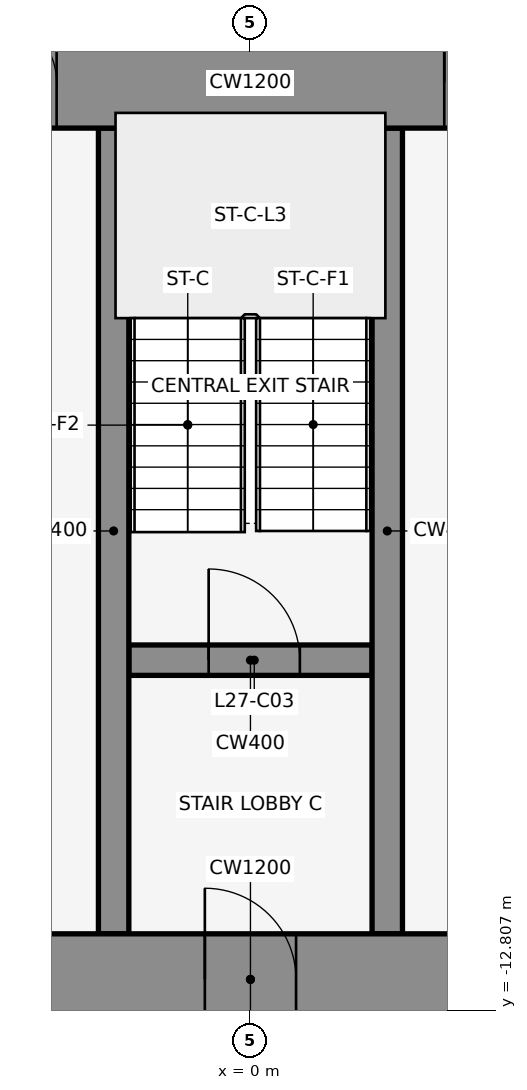
"""IFC4 building model, lengths in metres.
Left out: names, types, materials, properties, quantities, classifications, styles, units other than length and angle.
Written with IfcOpenShell. Run it as: python <this file> out.ifc"""

import sys

from ifc_helpers import new_model, si_unit, direction, frame, frame_2d, origin, place, context, subcontext, project, spatial, rectangle, extrude, element, fill, save


model = new_model("IFC4")
c1 = context("Model", 3, precision=1e-05, world=origin(), true_north=direction((0.0, 1.0)))
c2 = subcontext(c1, "Body", "Model", "MODEL_VIEW")
j1 = project(units=[si_unit("LENGTHUNIT", "METRE"), si_unit("PLANEANGLEUNIT", "RADIAN")], contexts=[c1])
p1 = place(None, origin())
s1 = spatial("IfcSite", under=j1, at=p1, CompositionType="ELEMENT")
p2 = place(p1, origin())
s2 = spatial("IfcBuilding", under=s1, at=p2, CompositionType="ELEMENT")
p3 = place(p2, frame((0.0, 0.0, 126.8)))
s3 = spatial("IfcBuildingStorey", under=s2, at=p3, CompositionType="ELEMENT", Elevation=126.8)
for number, where, z_axis, x_axis in (
    (1, (1.901, 1.08, 0.0), (0.0, 0.0, 1.0), (-0.84, -0.543, 0.0)),
    (2, (-0.068, -0.105, 0.0), (0.0, 0.0, 1.0), (-0.84, 0.543, 0.0)),
):
    element("IfcWall", number, at=place(p3, frame(where, z_axis=z_axis, x_axis=x_axis)), inside=s3, PredefinedType="STANDARD", context=c2, shape_type="SweptSolid", body=[
        extrude(rectangle(XDim=2.183, YDim=0.25, at=frame_2d((1.091, 0.0))), origin(), (0.0, 0.0, 1.0), 3.95),
    ])
p4 = place(p3, frame((-1.6, -8.2, 0.0), z_axis=(0.0, 0.0, 1.0), x_axis=(1.0, 0.0, 0.0)))
e3 = element("IfcWall", 3, at=p4, inside=s3, PredefinedType="SHEAR", context=c2, shape_type="SweptSolid", body=[
    extrude(rectangle(XDim=3.2, YDim=0.4, at=frame_2d((1.6, 0.0))), origin(), (0.0, 0.0, 1.0), 4.1),
])
p5 = place(p4, frame((1.05, 0.0, 0.0)))
e4 = element("IfcOpeningElement", 4, at=p5, cuts=e3, PredefinedType="OPENING", context=c2, shape_type="SweptSolid", body=[
    extrude(rectangle(XDim=1.2, YDim=2.1, at=frame_2d((0.6, 1.05))), frame((0.0, 0.212, 0.0), z_axis=(0.0, -1.0, 0.0), x_axis=(1.0, 0.0, 0.0)), (0.0, 0.0, 1.0), 0.424),
])
for number, where, z_axis, x_axis in (
    (5, (-1.8, -11.8, 0.0), (0.0, 0.0, 1.0), (0.0, 1.0, 0.0)),
    (6, (1.8, -11.8, 0.0), (0.0, 0.0, 1.0), (0.0, 1.0, 0.0)),
):
    element("IfcWall", number, at=place(p3, frame(where, z_axis=z_axis, x_axis=x_axis)), inside=s3, PredefinedType="SHEAR", context=c2, shape_type="SweptSolid", body=[
        extrude(rectangle(XDim=10.6, YDim=0.4, at=frame_2d((5.3, 0.0))), origin(), (0.0, 0.0, 1.0), 4.1),
    ])
p6 = place(p3, frame((-22.0, -0.6, 0.0), z_axis=(0.0, 0.0, 1.0), x_axis=(1.0, 0.0, 0.0)))
e7 = element("IfcWall", 7, at=p6, inside=s3, PredefinedType="SHEAR", context=c2, shape_type="SweptSolid", body=[
    extrude(rectangle(XDim=44.0, YDim=1.2, at=frame_2d((22.0, 0.0))), origin(), (0.0, 0.0, 1.0), 4.1),
])
p7 = place(p6, frame((18.55, 0.0, 0.0)))
e8 = element("IfcOpeningElement", 8, at=p7, cuts=e7, PredefinedType="OPENING", context=c2, shape_type="SweptSolid", body=[
    extrude(rectangle(XDim=0.9, YDim=2.1, at=frame_2d((0.45, 1.05))), frame((0.0, 0.612, 0.0), z_axis=(0.0, -1.0, 0.0), x_axis=(1.0, 0.0, 0.0)), (0.0, 0.0, 1.0), 1.224),
])
p8 = place(p6, frame((24.55, 0.0, 0.0)))
e9 = element("IfcOpeningElement", 9, at=p8, cuts=e7, PredefinedType="OPENING", context=c2, shape_type="SweptSolid", body=[
    extrude(rectangle(XDim=0.9, YDim=2.1, at=frame_2d((0.45, 1.05))), frame((0.0, 0.612, 0.0), z_axis=(0.0, -1.0, 0.0), x_axis=(1.0, 0.0, 0.0)), (0.0, 0.0, 1.0), 1.224),
])
p9 = place(p3, frame((-22.0, -12.4, 0.0), z_axis=(0.0, 0.0, 1.0), x_axis=(1.0, 0.0, 0.0)))
e10 = element("IfcWall", 10, at=p9, inside=s3, PredefinedType="SHEAR", context=c2, shape_type="SweptSolid", body=[
    extrude(rectangle(XDim=44.0, YDim=1.2, at=frame_2d((22.0, 0.0))), origin(), (0.0, 0.0, 1.0), 4.1),
])
p10 = place(p9, frame((2.2, 0.0, 0.0)))
e11 = element("IfcOpeningElement", 11, at=p10, cuts=e10, PredefinedType="OPENING", context=c2, shape_type="SweptSolid", body=[
    extrude(rectangle(XDim=1.2, YDim=2.1, at=frame_2d((0.6, 1.05))), frame((0.0, 0.612, 0.0), z_axis=(0.0, -1.0, 0.0), x_axis=(1.0, 0.0, 0.0)), (0.0, 0.0, 1.0), 1.224),
])
p11 = place(p9, frame((21.4, 0.0, 0.0)))
e12 = element("IfcOpeningElement", 12, at=p11, cuts=e10, PredefinedType="OPENING", context=c2, shape_type="SweptSolid", body=[
    extrude(rectangle(XDim=1.2, YDim=2.1, at=frame_2d((0.6, 1.05))), frame((0.0, 0.612, 0.0), z_axis=(0.0, -1.0, 0.0), x_axis=(1.0, 0.0, 0.0)), (0.0, 0.0, 1.0), 1.224),
])
p12 = place(p9, frame((40.6, 0.0, 0.0)))
e13 = element("IfcOpeningElement", 13, at=p12, cuts=e10, PredefinedType="OPENING", context=c2, shape_type="SweptSolid", body=[
    extrude(rectangle(XDim=1.2, YDim=2.1, at=frame_2d((0.6, 1.05))), frame((0.0, 0.612, 0.0), z_axis=(0.0, -1.0, 0.0), x_axis=(1.0, 0.0, 0.0)), (0.0, 0.0, 1.0), 1.224),
])
p13 = place(p9, frame((16.0, 0.0, 0.0)))
e14 = element("IfcOpeningElement", 14, at=p13, cuts=e10, PredefinedType="OPENING", context=c2, shape_type="SweptSolid", body=[
    extrude(rectangle(XDim=1.8, YDim=2.1, at=frame_2d((0.9, 1.05))), frame((0.0, 0.612, 0.0), z_axis=(0.0, -1.0, 0.0), x_axis=(1.0, 0.0, 0.0)), (0.0, 0.0, 1.0), 1.224),
])
p14 = place(p9, frame((6.3, 0.0, 0.0)))
e15 = element("IfcOpeningElement", 15, at=p14, cuts=e10, PredefinedType="OPENING", context=c2, shape_type="SweptSolid", body=[
    extrude(rectangle(XDim=1.2, YDim=2.1, at=frame_2d((0.6, 1.05))), frame((0.0, 0.612, 0.0), z_axis=(0.0, -1.0, 0.0), x_axis=(1.0, 0.0, 0.0)), (0.0, 0.0, 1.0), 1.224),
])
p15 = place(p9, frame((26.2, 0.0, 0.0)))
e16 = element("IfcOpeningElement", 16, at=p15, cuts=e10, PredefinedType="OPENING", context=c2, shape_type="SweptSolid", body=[
    extrude(rectangle(XDim=1.8, YDim=2.1, at=frame_2d((0.9, 1.05))), frame((0.0, 0.612, 0.0), z_axis=(0.0, -1.0, 0.0), x_axis=(1.0, 0.0, 0.0)), (0.0, 0.0, 1.0), 1.224),
])
p16 = place(p9, frame((36.5, 0.0, 0.0)))
e17 = element("IfcOpeningElement", 17, at=p16, cuts=e10, PredefinedType="OPENING", context=c2, shape_type="SweptSolid", body=[
    extrude(rectangle(XDim=1.2, YDim=2.1, at=frame_2d((0.6, 1.05))), frame((0.0, 0.612, 0.0), z_axis=(0.0, -1.0, 0.0), x_axis=(1.0, 0.0, 0.0)), (0.0, 0.0, 1.0), 1.224),
])
p17 = place(p5, origin())
e18 = element("IfcDoor", 18, at=p17, inside=s3, OperationType="SINGLE_SWING_LEFT", PredefinedType="DOOR", context=c2, shape_type="SweptSolid", body=[
    extrude(rectangle(XDim=1.2, YDim=2.1, at=frame_2d((0.6, 1.05))), frame((0.0, 0.025, 0.0), z_axis=(0.0, -1.0, 0.0), x_axis=(1.0, 0.0, 0.0)), (0.0, 0.0, 1.0), 0.05),
])
fill(e4, e18)
p18 = place(p7, origin())
e19 = element("IfcDoor", 19, at=p18, inside=s3, OperationType="SINGLE_SWING_LEFT", PredefinedType="DOOR", context=c2, shape_type="SweptSolid", body=[
    extrude(rectangle(XDim=0.9, YDim=2.1, at=frame_2d((0.45, 1.05))), frame((0.0, 0.025, 0.0), z_axis=(0.0, -1.0, 0.0), x_axis=(1.0, 0.0, 0.0)), (0.0, 0.0, 1.0), 0.05),
])
fill(e8, e19)
p19 = place(p8, origin())
e20 = element("IfcDoor", 20, at=p19, inside=s3, OperationType="SINGLE_SWING_LEFT", PredefinedType="DOOR", context=c2, shape_type="SweptSolid", body=[
    extrude(rectangle(XDim=0.9, YDim=2.1, at=frame_2d((0.45, 1.05))), frame((0.0, 0.025, 0.0), z_axis=(0.0, -1.0, 0.0), x_axis=(1.0, 0.0, 0.0)), (0.0, 0.0, 1.0), 0.05),
])
fill(e9, e20)
p20 = place(p11, frame((1.2, 0.0, 0.0), z_axis=(0.0, 0.0, 1.0), x_axis=(-1.0, 0.0, 0.0)))
e21 = element("IfcDoor", 21, at=p20, inside=s3, OperationType="SINGLE_SWING_RIGHT", PredefinedType="DOOR", context=c2, shape_type="SweptSolid", body=[
    extrude(rectangle(XDim=1.2, YDim=2.1, at=frame_2d((0.6, 1.05))), frame((0.0, 0.025, 0.0), z_axis=(0.0, -1.0, 0.0), x_axis=(1.0, 0.0, 0.0)), (0.0, 0.0, 1.0), 0.05),
])
fill(e12, e21)
save(model, sys.argv[1])
